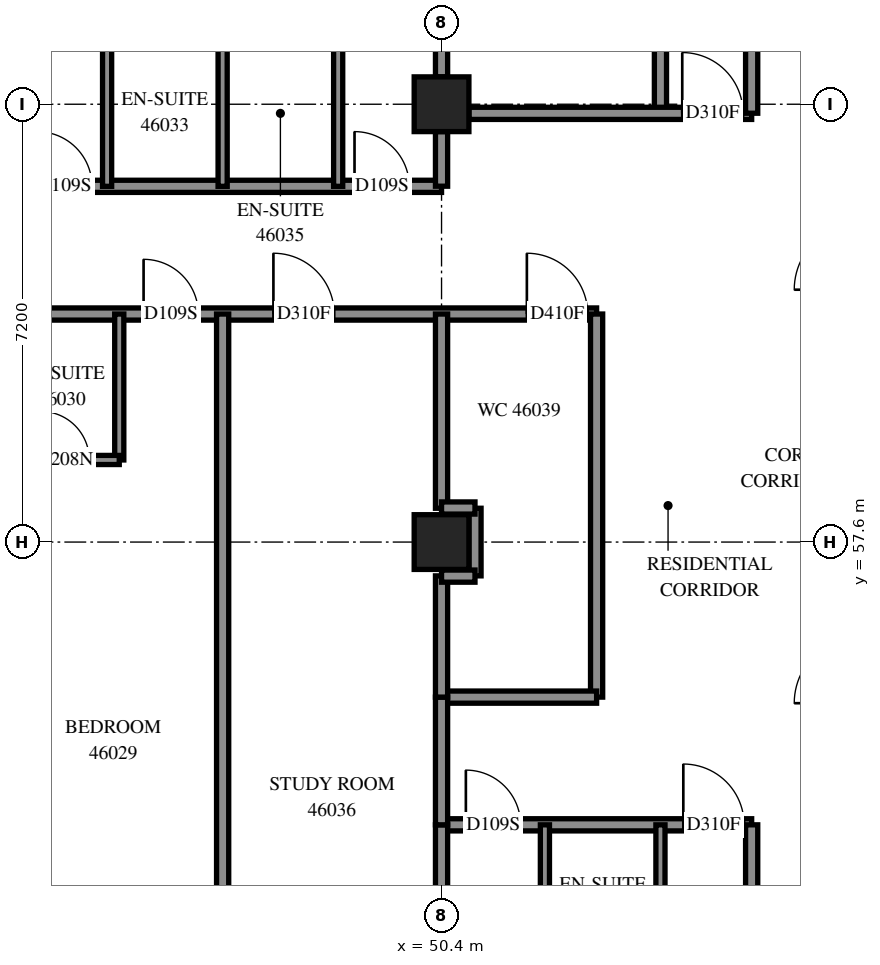
"""IFC4 building model, lengths in metres.
Left out: names, types, materials, properties, quantities, classifications, styles, units other than length and angle.
Written with IfcOpenShell. Run it as: python <this file> out.ifc"""

import sys

from ifc_helpers import new_model, si_unit, direction, frame, frame_2d, origin, origin_2d, place, context, subcontext, project, spatial, rectangle, extrude, element, fill, save


model = new_model("IFC4")
c1 = context("Model", 3, precision=1e-05, world=origin(), true_north=direction((0.0, 1.0)))
c2 = subcontext(c1, "Body", "Model", "MODEL_VIEW")
j1 = project(units=[si_unit("LENGTHUNIT", "METRE"), si_unit("PLANEANGLEUNIT", "RADIAN")], contexts=[c1])
p1 = place(None, origin())
s1 = spatial("IfcSite", under=j1, at=p1, CompositionType="ELEMENT")
p2 = place(p1, origin())
s2 = spatial("IfcBuilding", under=s1, at=p2, CompositionType="ELEMENT")
p3 = place(p2, frame((0.0, 0.0, 169.4)))
s3 = spatial("IfcBuildingStorey", under=s2, at=p3, CompositionType="ELEMENT", Elevation=169.4)
for number, where, z_axis, x_axis in (
    (1, (50.4, 57.6, 0.0), (0.0, 0.0, 1.0), (1.0, 0.0, 0.0)),
    (2, (50.4, 64.8, 0.0), (0.0, 0.0, 1.0), (1.0, 0.0, 0.0)),
):
    element("IfcColumn", number, at=place(p3, frame(where, z_axis=z_axis, x_axis=x_axis)), inside=s3, PredefinedType="COLUMN", context=c2, shape_type="SweptSolid", body=[
        extrude(rectangle(XDim=0.9, YDim=0.9, at=origin_2d()), origin(), (0.0, 0.0, 1.0), 3.1),
    ])
p4 = place(p3, frame((36.0, 61.35, 0.0), z_axis=(0.0, 0.0, 1.0), x_axis=(1.0, 0.0, 0.0)))
e3 = element("IfcWall", 3, at=p4, inside=s3, PredefinedType="PARTITIONING", context=c2, shape_type="SweptSolid", body=[
    extrude(rectangle(XDim=16.95, YDim=0.2, at=frame_2d((8.475, 0.0))), origin(), (0.0, 0.0, 1.0), 3.1),
])
p5 = place(p4, frame((2.3, 0.0, 0.0)))
e4 = element("IfcOpeningElement", 4, at=p5, cuts=e3, PredefinedType="OPENING", context=c2, shape_type="SweptSolid", body=[
    extrude(rectangle(XDim=0.9, YDim=2.1, at=frame_2d((0.45, 1.05))), frame((0.0, 0.11, 0.0), z_axis=(0.0, -1.0, 0.0), x_axis=(1.0, 0.0, 0.0)), (0.0, 0.0, 1.0), 0.22),
])
p6 = place(p4, frame((4.125, 0.0, 0.0)))
e5 = element("IfcOpeningElement", 5, at=p6, cuts=e3, PredefinedType="OPENING", context=c2, shape_type="SweptSolid", body=[
    extrude(rectangle(XDim=1.0, YDim=2.1, at=frame_2d((0.5, 1.05))), frame((0.0, 0.11, 0.0), z_axis=(0.0, -1.0, 0.0), x_axis=(1.0, 0.0, 0.0)), (0.0, 0.0, 1.0), 0.22),
])
p7 = place(p4, frame((9.5, 0.0, 0.0)))
e6 = element("IfcOpeningElement", 6, at=p7, cuts=e3, PredefinedType="OPENING", context=c2, shape_type="SweptSolid", body=[
    extrude(rectangle(XDim=0.9, YDim=2.1, at=frame_2d((0.45, 1.05))), frame((0.0, 0.11, 0.0), z_axis=(0.0, -1.0, 0.0), x_axis=(1.0, 0.0, 0.0)), (0.0, 0.0, 1.0), 0.22),
])
p8 = place(p4, frame((11.635, 0.0, 0.0)))
e7 = element("IfcOpeningElement", 7, at=p8, cuts=e3, PredefinedType="OPENING", context=c2, shape_type="SweptSolid", body=[
    extrude(rectangle(XDim=1.0, YDim=2.1, at=frame_2d((0.5, 1.05))), frame((0.0, 0.11, 0.0), z_axis=(0.0, -1.0, 0.0), x_axis=(1.0, 0.0, 0.0)), (0.0, 0.0, 1.0), 0.22),
])
p9 = place(p4, frame((15.803, 0.0, 0.0)))
e8 = element("IfcOpeningElement", 8, at=p9, cuts=e3, PredefinedType="OPENING", context=c2, shape_type="SweptSolid", body=[
    extrude(rectangle(XDim=1.0, YDim=2.1, at=frame_2d((0.5, 1.05))), frame((0.0, 0.11, 0.0), z_axis=(0.0, -1.0, 0.0), x_axis=(1.0, 0.0, 0.0)), (0.0, 0.0, 1.0), 0.22),
])
p10 = place(p3, frame((46.8, 49.7, 0.0), z_axis=(0.0, 0.0, 1.0), x_axis=(0.0, 1.0, 0.0)))
e9 = element("IfcWall", 9, at=p10, inside=s3, PredefinedType="PARTITIONING", context=c2, shape_type="SweptSolid", body=[
    extrude(rectangle(XDim=11.65, YDim=0.2, at=frame_2d((5.825, 0.0))), origin(), (0.0, 0.0, 1.0), 3.1),
])
p11 = place(p3, frame((40.65, 63.45, 0.0), z_axis=(0.0, 0.0, 1.0), x_axis=(1.0, 0.0, 0.0)))
e10 = element("IfcWall", 10, at=p11, inside=s3, PredefinedType="PARTITIONING", context=c2, shape_type="SweptSolid", body=[
    extrude(rectangle(XDim=9.75, YDim=0.2, at=frame_2d((4.875, 0.0))), origin(), (0.0, 0.0, 1.0), 3.1),
])
p12 = place(p11, frame((0.144, 0.0, 0.0)))
e11 = element("IfcOpeningElement", 11, at=p12, cuts=e10, PredefinedType="OPENING", context=c2, shape_type="SweptSolid", body=[
    extrude(rectangle(XDim=1.0, YDim=2.1, at=frame_2d((0.5, 1.05))), frame((0.0, 0.11, 0.0), z_axis=(0.0, -1.0, 0.0), x_axis=(1.0, 0.0, 0.0)), (0.0, 0.0, 1.0), 0.22),
])
p13 = place(p11, frame((3.102, 0.0, 0.0)))
e12 = element("IfcOpeningElement", 12, at=p13, cuts=e10, PredefinedType="OPENING", context=c2, shape_type="SweptSolid", body=[
    extrude(rectangle(XDim=0.9, YDim=2.1, at=frame_2d((0.45, 1.05))), frame((0.0, 0.11, 0.0), z_axis=(0.0, -1.0, 0.0), x_axis=(1.0, 0.0, 0.0)), (0.0, 0.0, 1.0), 0.22),
])
p14 = place(p11, frame((8.319, 0.0, 0.0)))
e13 = element("IfcOpeningElement", 13, at=p14, cuts=e10, PredefinedType="OPENING", context=c2, shape_type="SweptSolid", body=[
    extrude(rectangle(XDim=0.9, YDim=2.1, at=frame_2d((0.45, 1.05))), frame((0.0, 0.11, 0.0), z_axis=(0.0, -1.0, 0.0), x_axis=(1.0, 0.0, 0.0)), (0.0, 0.0, 1.0), 0.22),
])
p15 = place(p3, frame((54.0, 64.65, 0.0), z_axis=(0.0, 0.0, 1.0), x_axis=(0.0, 1.0, 0.0)))
e14 = element("IfcWall", 14, at=p15, inside=s3, PredefinedType="PARTITIONING", context=c2, shape_type="SweptSolid", body=[
    extrude(rectangle(XDim=8.121, YDim=0.2, at=frame_2d((4.061, 0.0))), origin(), (0.0, 0.0, 1.0), 3.1),
])
for number, where, z_axis, x_axis in (
    (15, (52.95, 55.05, 0.0), (0.0, 0.0, 1.0), (0.0, 1.0, 0.0)),
    (16, (50.4, 65.25, 0.0), (0.0, 0.0, 1.0), (0.0, 1.0, 0.0)),
):
    element("IfcWall", number, at=place(p3, frame(where, z_axis=z_axis, x_axis=x_axis)), inside=s3, PredefinedType="PARTITIONING", context=c2, shape_type="SweptSolid", body=[
        extrude(rectangle(XDim=6.3, YDim=0.2, at=frame_2d((3.15, 0.0))), origin(), (0.0, 0.0, 1.0), 3.1),
    ])
p16 = place(p3, frame((50.4, 52.95, 0.0), z_axis=(0.0, 0.0, 1.0), x_axis=(1.0, 0.0, 0.0)))
e17 = element("IfcWall", 17, at=p16, inside=s3, PredefinedType="PARTITIONING", context=c2, shape_type="SweptSolid", body=[
    extrude(rectangle(XDim=5.1, YDim=0.2, at=frame_2d((2.55, 0.0))), origin(), (0.0, 0.0, 1.0), 3.1),
])
p17 = place(p16, frame((0.4, 0.0, 0.0)))
e18 = element("IfcOpeningElement", 18, at=p17, cuts=e17, PredefinedType="OPENING", context=c2, shape_type="SweptSolid", body=[
    extrude(rectangle(XDim=0.9, YDim=2.1, at=frame_2d((0.45, 1.05))), frame((0.0, 0.11, 0.0), z_axis=(0.0, -1.0, 0.0), x_axis=(1.0, 0.0, 0.0)), (0.0, 0.0, 1.0), 0.22),
])
p18 = place(p16, frame((3.976, 0.0, 0.0)))
e19 = element("IfcOpeningElement", 19, at=p18, cuts=e17, PredefinedType="OPENING", context=c2, shape_type="SweptSolid", body=[
    extrude(rectangle(XDim=1.0, YDim=2.1, at=frame_2d((0.5, 1.05))), frame((0.0, 0.11, 0.0), z_axis=(0.0, -1.0, 0.0), x_axis=(1.0, 0.0, 0.0)), (0.0, 0.0, 1.0), 0.22),
])
p19 = place(p3, frame((55.5, 48.3, 0.0), z_axis=(0.0, 0.0, 1.0), x_axis=(0.0, 1.0, 0.0)))
e20 = element("IfcWall", 20, at=p19, inside=s3, PredefinedType="PARTITIONING", context=c2, shape_type="SweptSolid", body=[
    extrude(rectangle(XDim=4.65, YDim=0.2, at=frame_2d((2.325, 0.0))), origin(), (0.0, 0.0, 1.0), 3.1),
])
p20 = place(p3, frame((50.85, 64.65, 0.0), z_axis=(0.0, 0.0, 1.0), x_axis=(1.0, 0.0, 0.0)))
e21 = element("IfcWall", 21, at=p20, inside=s3, PredefinedType="PARTITIONING", context=c2, shape_type="SweptSolid", body=[
    extrude(rectangle(XDim=4.65, YDim=0.2, at=frame_2d((2.325, 0.0))), origin(), (0.0, 0.0, 1.0), 3.1),
])
p21 = place(p20, frame((3.509, 0.0, 0.0)))
e22 = element("IfcOpeningElement", 22, at=p21, cuts=e21, PredefinedType="OPENING", context=c2, shape_type="SweptSolid", body=[
    extrude(rectangle(XDim=1.0, YDim=2.1, at=frame_2d((0.5, 1.05))), frame((0.0, 0.11, 0.0), z_axis=(0.0, -1.0, 0.0), x_axis=(1.0, 0.0, 0.0)), (0.0, 0.0, 1.0), 0.22),
])
p22 = place(p3, frame((50.4, 58.156, 0.0), z_axis=(0.0, 0.0, 1.0), x_axis=(0.0, 1.0, 0.0)))
e23 = element("IfcWall", 23, at=p22, inside=s3, PredefinedType="PARTITIONING", context=c2, shape_type="SweptSolid", body=[
    extrude(rectangle(XDim=3.194, YDim=0.2, at=frame_2d((1.597, 0.0))), origin(), (0.0, 0.0, 1.0), 3.1),
])
p23 = place(p3, frame((50.4, 55.05, 0.0), z_axis=(0.0, 0.0, 1.0), x_axis=(1.0, 0.0, 0.0)))
e24 = element("IfcWall", 24, at=p23, inside=s3, PredefinedType="PARTITIONING", context=c2, shape_type="SweptSolid", body=[
    extrude(rectangle(XDim=2.55, YDim=0.2, at=frame_2d((1.275, 0.0))), origin(), (0.0, 0.0, 1.0), 3.1),
])
for number, where, z_axis, x_axis in (
    (25, (52.1, 50.55, 0.0), (0.0, 0.0, 1.0), (0.0, 1.0, 0.0)),
    (26, (54.0, 50.55, 0.0), (0.0, 0.0, 1.0), (0.0, 1.0, 0.0)),
    (27, (45.1, 58.95, 0.0), (0.0, 0.0, 1.0), (0.0, 1.0, 0.0)),
    (28, (44.9, 63.45, 0.0), (0.0, 0.0, 1.0), (0.0, 1.0, 0.0)),
    (29, (46.8, 63.45, 0.0), (0.0, 0.0, 1.0), (0.0, 1.0, 0.0)),
    (30, (48.7, 63.45, 0.0), (0.0, 0.0, 1.0), (0.0, 1.0, 0.0)),
):
    element("IfcWall", number, at=place(p3, frame(where, z_axis=z_axis, x_axis=x_axis)), inside=s3, PredefinedType="PARTITIONING", context=c2, shape_type="SweptSolid", body=[
        extrude(rectangle(XDim=2.4, YDim=0.15, at=frame_2d((1.2, 0.0))), origin(), (0.0, 0.0, 1.0), 3.1),
    ])
p24 = place(p3, frame((55.5, 64.652, 0.0), z_axis=(0.0, 0.0, 1.0), x_axis=(0.0, 1.0, 0.0)))
e31 = element("IfcWall", 31, at=p24, inside=s3, PredefinedType="PARTITIONING", context=c2, shape_type="SweptSolid", body=[
    extrude(rectangle(XDim=2.248, YDim=0.2, at=frame_2d((1.124, 0.0))), origin(), (0.0, 0.0, 1.0), 3.1),
])
for number, where, z_axis, x_axis in (
    (32, (50.4, 50.85, 0.0), (0.0, 0.0, 1.0), (0.0, 1.0, 0.0)),
    (33, (50.4, 52.95, 0.0), (0.0, 0.0, 1.0), (0.0, 1.0, 0.0)),
):
    element("IfcWall", number, at=place(p3, frame(where, z_axis=z_axis, x_axis=x_axis)), inside=s3, PredefinedType="PARTITIONING", context=c2, shape_type="SweptSolid", body=[
        extrude(rectangle(XDim=2.1, YDim=0.2, at=frame_2d((1.05, 0.0))), origin(), (0.0, 0.0, 1.0), 3.1),
    ])
p25 = place(p3, frame((50.4, 55.05, 0.0), z_axis=(0.0, 0.0, 1.0), x_axis=(0.0, 1.0, 0.0)))
e34 = element("IfcWall", 34, at=p25, inside=s3, PredefinedType="PARTITIONING", context=c2, shape_type="SweptSolid", body=[
    extrude(rectangle(XDim=1.994, YDim=0.2, at=frame_2d((0.997, 0.0))), origin(), (0.0, 0.0, 1.0), 3.1),
])
p26 = place(p3, frame((43.2, 58.95, 0.0), z_axis=(0.0, 0.0, 1.0), x_axis=(1.0, 0.0, 0.0)))
e35 = element("IfcWall", 35, at=p26, inside=s3, PredefinedType="PARTITIONING", context=c2, shape_type="SweptSolid", body=[
    extrude(rectangle(XDim=1.9, YDim=0.15, at=frame_2d((0.95, 0.0))), origin(), (0.0, 0.0, 1.0), 3.1),
])
p27 = place(p26, frame((0.607, 0.0, 0.0)))
e36 = element("IfcOpeningElement", 36, at=p27, cuts=e35, PredefinedType="OPENING", context=c2, shape_type="SweptSolid", body=[
    extrude(rectangle(XDim=0.8, YDim=2.1, at=frame_2d((0.4, 1.05))), frame((0.0, 0.085, 0.0), z_axis=(0.0, -1.0, 0.0), x_axis=(1.0, 0.0, 0.0)), (0.0, 0.0, 1.0), 0.17),
])
p28 = place(p3, frame((50.95, 57.044, 0.0), z_axis=(0.0, 0.0, 1.0), x_axis=(0.0, 1.0, 0.0)))
e37 = element("IfcWall", 37, at=p28, inside=s3, PredefinedType="PARTITIONING", context=c2, shape_type="SweptSolid", body=[
    extrude(rectangle(XDim=1.112, YDim=0.2, at=frame_2d((0.556, 0.0))), origin(), (0.0, 0.0, 1.0), 3.1),
])
p29 = place(p3, frame((50.4, 63.452, 0.0), z_axis=(0.0, 0.0, 1.0), x_axis=(0.0, 1.0, 0.0)))
e38 = element("IfcWall", 38, at=p29, inside=s3, PredefinedType="PARTITIONING", context=c2, shape_type="SweptSolid", body=[
    extrude(rectangle(XDim=0.898, YDim=0.2, at=frame_2d((0.449, 0.0))), origin(), (0.0, 0.0, 1.0), 3.1),
])
for number, where, z_axis, x_axis in (
    (39, (50.4, 58.16, 0.0), (0.0, 0.0, 1.0), (1.0, 0.0, 0.0)),
    (40, (50.4, 57.04, 0.0), (0.0, 0.0, 1.0), (1.0, 0.0, 0.0)),
):
    element("IfcWall", number, at=place(p3, frame(where, z_axis=z_axis, x_axis=x_axis)), inside=s3, PredefinedType="PARTITIONING", context=c2, shape_type="SweptSolid", body=[
        extrude(rectangle(XDim=0.55, YDim=0.2, at=frame_2d((0.275, 0.0))), origin(), (0.0, 0.0, 1.0), 3.1),
    ])
p30 = place(p7, origin())
e41 = element("IfcDoor", 41, at=p30, inside=s3, OperationType="SINGLE_SWING_LEFT", PredefinedType="DOOR", context=c2, shape_type="SweptSolid", body=[
    extrude(rectangle(XDim=0.9, YDim=2.1, at=frame_2d((0.45, 1.05))), frame((0.0, 0.025, 0.0), z_axis=(0.0, -1.0, 0.0), x_axis=(1.0, 0.0, 0.0)), (0.0, 0.0, 1.0), 0.05),
])
fill(e6, e41)
p31 = place(p27, origin())
e42 = element("IfcDoor", 42, at=p31, inside=s3, OperationType="SINGLE_SWING_RIGHT", PredefinedType="DOOR", context=c2, shape_type="SweptSolid", body=[
    extrude(rectangle(XDim=0.8, YDim=2.1, at=frame_2d((0.4, 1.05))), frame((0.0, 0.025, 0.0), z_axis=(0.0, -1.0, 0.0), x_axis=(1.0, 0.0, 0.0)), (0.0, 0.0, 1.0), 0.05),
])
fill(e36, e42)
p32 = place(p13, origin())
e43 = element("IfcDoor", 43, at=p32, inside=s3, OperationType="SINGLE_SWING_RIGHT", PredefinedType="DOOR", context=c2, shape_type="SweptSolid", body=[
    extrude(rectangle(XDim=0.9, YDim=2.1, at=frame_2d((0.45, 1.05))), frame((0.0, 0.025, 0.0), z_axis=(0.0, -1.0, 0.0), x_axis=(1.0, 0.0, 0.0)), (0.0, 0.0, 1.0), 0.05),
])
fill(e12, e43)
p33 = place(p14, origin())
e44 = element("IfcDoor", 44, at=p33, inside=s3, OperationType="SINGLE_SWING_LEFT", PredefinedType="DOOR", context=c2, shape_type="SweptSolid", body=[
    extrude(rectangle(XDim=0.9, YDim=2.1, at=frame_2d((0.45, 1.05))), frame((0.0, 0.025, 0.0), z_axis=(0.0, -1.0, 0.0), x_axis=(1.0, 0.0, 0.0)), (0.0, 0.0, 1.0), 0.05),
])
fill(e13, e44)
p34 = place(p8, origin())
e45 = element("IfcDoor", 45, at=p34, inside=s3, OperationType="SINGLE_SWING_RIGHT", PredefinedType="DOOR", context=c2, shape_type="SweptSolid", body=[
    extrude(rectangle(XDim=1.0, YDim=2.1, at=frame_2d((0.5, 1.05))), frame((0.0, 0.025, 0.0), z_axis=(0.0, -1.0, 0.0), x_axis=(1.0, 0.0, 0.0)), (0.0, 0.0, 1.0), 0.05),
])
fill(e7, e45)
p35 = place(p21, origin())
e46 = element("IfcDoor", 46, at=p35, inside=s3, OperationType="SINGLE_SWING_LEFT", PredefinedType="DOOR", context=c2, shape_type="SweptSolid", body=[
    extrude(rectangle(XDim=1.0, YDim=2.1, at=frame_2d((0.5, 1.05))), frame((0.0, 0.025, 0.0), z_axis=(0.0, -1.0, 0.0), x_axis=(1.0, 0.0, 0.0)), (0.0, 0.0, 1.0), 0.05),
])
fill(e22, e46)
p36 = place(p9, origin())
e47 = element("IfcDoor", 47, at=p36, inside=s3, OperationType="SINGLE_SWING_LEFT", PredefinedType="DOOR", context=c2, shape_type="SweptSolid", body=[
    extrude(rectangle(XDim=1.0, YDim=2.1, at=frame_2d((0.5, 1.05))), frame((0.0, 0.025, 0.0), z_axis=(0.0, -1.0, 0.0), x_axis=(1.0, 0.0, 0.0)), (0.0, 0.0, 1.0), 0.05),
])
fill(e8, e47)
p37 = place(p17, origin())
e48 = element("IfcDoor", 48, at=p37, inside=s3, OperationType="SINGLE_SWING_LEFT", PredefinedType="DOOR", context=c2, shape_type="SweptSolid", body=[
    extrude(rectangle(XDim=0.9, YDim=2.1, at=frame_2d((0.45, 1.05))), frame((0.0, 0.025, 0.0), z_axis=(0.0, -1.0, 0.0), x_axis=(1.0, 0.0, 0.0)), (0.0, 0.0, 1.0), 0.05),
])
fill(e18, e48)
p38 = place(p18, origin())
e49 = element("IfcDoor", 49, at=p38, inside=s3, OperationType="SINGLE_SWING_RIGHT", PredefinedType="DOOR", context=c2, shape_type="SweptSolid", body=[
    extrude(rectangle(XDim=1.0, YDim=2.1, at=frame_2d((0.5, 1.05))), frame((0.0, 0.025, 0.0), z_axis=(0.0, -1.0, 0.0), x_axis=(1.0, 0.0, 0.0)), (0.0, 0.0, 1.0), 0.05),
])
fill(e19, e49)
save(model, sys.argv[1])
